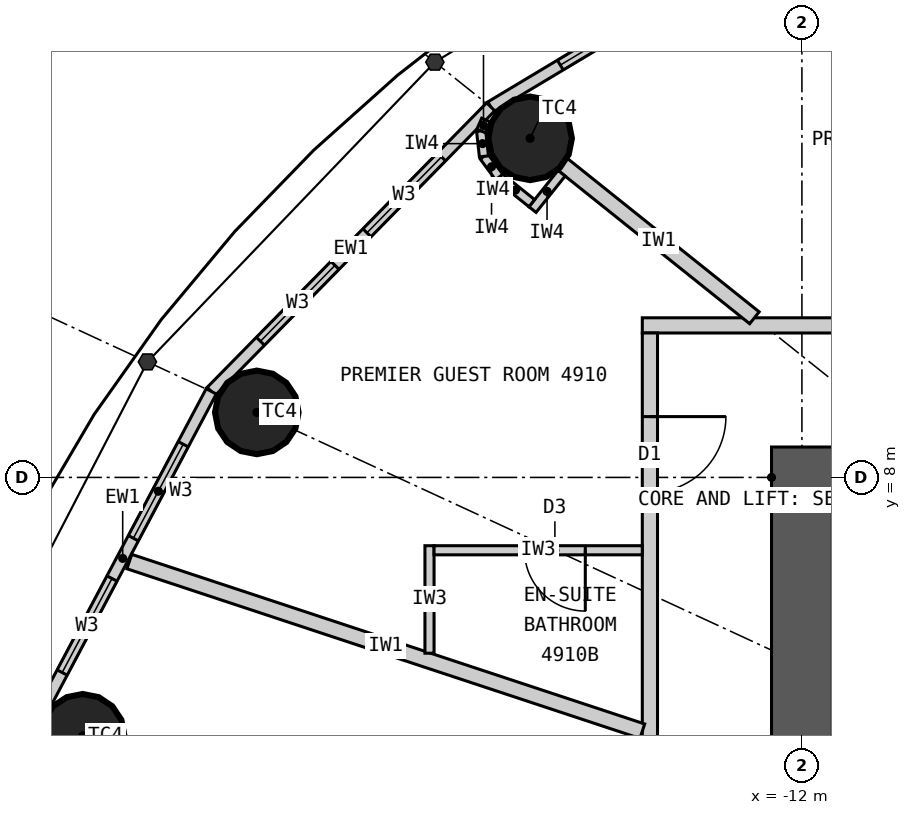
"""IFC4 building model, lengths in metres.
Left out: names, types, materials, properties, quantities, classifications, styles, units other than length and angle.
Written with IfcOpenShell. Run it as: python <this file> out.ifc"""

import sys

from ifc_helpers import new_model, si_unit, direction, frame, frame_2d, origin, origin_2d, place, context, subcontext, project, spatial, rectangle, circle, extrude, clip, halfspace, element, fill, save


model = new_model("IFC4")
c1 = context("Model", 3, precision=1e-05, world=origin(), true_north=direction((0.0, 1.0)))
c2 = subcontext(c1, "Body", "Model", "MODEL_VIEW")
j1 = project(units=[si_unit("LENGTHUNIT", "METRE"), si_unit("PLANEANGLEUNIT", "RADIAN")], contexts=[c1])
p1 = place(None, origin())
s1 = spatial("IfcSite", under=j1, at=p1, CompositionType="ELEMENT")
p2 = place(p1, origin())
s2 = spatial("IfcBuilding", under=s1, at=p2, CompositionType="ELEMENT")
p3 = place(p2, frame((0.0, 0.0, 183.0)))
s3 = spatial("IfcBuildingStorey", under=s2, at=p3, CompositionType="ELEMENT", Elevation=183.0)
for number, where, z_axis, x_axis in (
    (1, (-15.576, 12.461, 0.0), (0.0, 0.0, 1.0), (1.0, 0.0, 0.0)),
    (2, (-19.172, 8.855, 0.0), (0.0, 0.0, 1.0), (1.0, 0.0, 0.0)),
    (3, (-21.463, 4.601, 0.0), (0.0, 0.0, 1.0), (1.0, 0.0, 0.0)),
):
    element("IfcColumn", number, at=place(p3, frame(where, z_axis=z_axis, x_axis=x_axis)), inside=s3, PredefinedType="COLUMN", context=c2, shape_type="Clipping", body=[
        clip(extrude(circle(Radius=0.55, at=origin_2d()), origin(), (0.0, 0.0, 1.0), 3.3), halfspace(frame((0.0, 0.0, 2.25), z_axis=(0.0, 0.0, 1.0), x_axis=(1.0, 0.0, 0.0)), False)),
    ])
p4 = place(p3, frame((-12.4, 8.0, 0.0), z_axis=(0.0, 0.0, 1.0), x_axis=(1.0, 0.0, 0.0)))
e4 = element("IfcWall", 4, at=p4, inside=s3, PredefinedType="SHEAR", context=c2, shape_type="SweptSolid", body=[
    extrude(rectangle(XDim=24.8, YDim=0.8, at=frame_2d((12.4, 0.0))), origin(), (0.0, 0.0, 1.0), 3.3),
])
p5 = place(p4, frame((11.1, 0.0, 0.0)))
e5 = element("IfcOpeningElement", 5, at=p5, cuts=e4, PredefinedType="OPENING", context=c2, shape_type="SweptSolid", body=[
    extrude(rectangle(XDim=1.2, YDim=2.2, at=frame_2d((0.6, 1.1))), frame((0.0, 0.41, 0.0), z_axis=(0.0, -1.0, 0.0), x_axis=(1.0, 0.0, 0.0)), (0.0, 0.0, 1.0), 0.82),
])
p6 = place(p4, frame((18.7, 0.0, 0.0)))
e6 = element("IfcOpeningElement", 6, at=p6, cuts=e4, PredefinedType="OPENING", context=c2, shape_type="SweptSolid", body=[
    extrude(rectangle(XDim=0.9, YDim=2.2, at=frame_2d((0.45, 1.1))), frame((0.0, 0.41, 0.0), z_axis=(0.0, -1.0, 0.0), x_axis=(1.0, 0.0, 0.0)), (0.0, 0.0, 1.0), 0.82),
])
p7 = place(p3, frame((-12.0, 7.6, 0.0), z_axis=(0.0, 0.0, 1.0), x_axis=(0.0, -1.0, 0.0)))
e7 = element("IfcWall", 7, at=p7, inside=s3, PredefinedType="SHEAR", context=c2, shape_type="SweptSolid", body=[
    extrude(rectangle(XDim=15.2, YDim=0.8, at=frame_2d((7.6, 0.0))), origin(), (0.0, 0.0, 1.0), 3.3),
])
p8 = place(p7, frame((6.7, 0.0, 0.0)))
e8 = element("IfcOpeningElement", 8, at=p8, cuts=e7, PredefinedType="OPENING", context=c2, shape_type="SweptSolid", body=[
    extrude(rectangle(XDim=1.8, YDim=2.2, at=frame_2d((0.9, 1.1))), frame((0.0, 0.41, 0.0), z_axis=(0.0, -1.0, 0.0), x_axis=(1.0, 0.0, 0.0)), (0.0, 0.0, 1.0), 0.82),
])
p9 = place(p3, frame((-11.346, 15.722, 0.0), z_axis=(0.0, 0.0, 1.0), x_axis=(-0.857695199231, -0.514158482587, 0.0)))
e9 = element("IfcWall", 9, at=p9, inside=s3, PredefinedType="ELEMENTEDWALL", context=c2, shape_type="SweptSolid", body=[
    extrude(rectangle(XDim=5.536, YDim=0.15, at=frame_2d((2.768, 0.0))), origin(), (0.0, 0.0, 1.0), 3.05),
])
p10 = place(p9, frame((1.068, 0.0, 0.9)))
e10 = element("IfcOpeningElement", 10, at=p10, cuts=e9, PredefinedType="OPENING", context=c2, shape_type="SweptSolid", body=[
    extrude(rectangle(XDim=1.4, YDim=1.9, at=frame_2d((0.7, 0.95))), frame((0.0, 0.085, 0.0), z_axis=(0.0, -1.0, 0.0), x_axis=(1.0, 0.0, 0.0)), (0.0, 0.0, 1.0), 0.17),
])
p11 = place(p9, frame((3.068, 0.0, 0.9)))
e11 = element("IfcOpeningElement", 11, at=p11, cuts=e9, PredefinedType="OPENING", context=c2, shape_type="SweptSolid", body=[
    extrude(rectangle(XDim=1.4, YDim=1.9, at=frame_2d((0.7, 0.95))), frame((0.0, 0.085, 0.0), z_axis=(0.0, -1.0, 0.0), x_axis=(1.0, 0.0, 0.0)), (0.0, 0.0, 1.0), 0.17),
])
p12 = place(p3, frame((-16.095, 12.876, 0.0), z_axis=(0.0, 0.0, 1.0), x_axis=(-0.700727467776, -0.71342905457, 0.0)))
e12 = element("IfcWall", 12, at=p12, inside=s3, PredefinedType="ELEMENTEDWALL", context=c2, shape_type="SweptSolid", body=[
    extrude(rectangle(XDim=5.247, YDim=0.15, at=frame_2d((2.624, 0.0))), origin(), (0.0, 0.0, 1.0), 3.05),
])
p13 = place(p12, frame((0.924, 0.0, 0.9)))
e13 = element("IfcOpeningElement", 13, at=p13, cuts=e12, PredefinedType="OPENING", context=c2, shape_type="SweptSolid", body=[
    extrude(rectangle(XDim=1.4, YDim=1.9, at=frame_2d((0.7, 0.95))), frame((0.0, 0.085, 0.0), z_axis=(0.0, -1.0, 0.0), x_axis=(1.0, 0.0, 0.0)), (0.0, 0.0, 1.0), 0.17),
])
p14 = place(p12, frame((2.924, 0.0, 0.9)))
e14 = element("IfcOpeningElement", 14, at=p14, cuts=e12, PredefinedType="OPENING", context=c2, shape_type="SweptSolid", body=[
    extrude(rectangle(XDim=1.4, YDim=1.9, at=frame_2d((0.7, 0.95))), frame((0.0, 0.085, 0.0), z_axis=(0.0, -1.0, 0.0), x_axis=(1.0, 0.0, 0.0)), (0.0, 0.0, 1.0), 0.17),
])
p15 = place(p3, frame((-19.772, 9.132, 0.0), z_axis=(0.0, 0.0, 1.0), x_axis=(-0.468428906714, -0.883501193748, 0.0)))
e15 = element("IfcWall", 15, at=p15, inside=s3, PredefinedType="ELEMENTEDWALL", context=c2, shape_type="SweptSolid", body=[
    extrude(rectangle(XDim=4.974, YDim=0.15, at=frame_2d((2.487, 0.0))), origin(), (0.0, 0.0, 1.0), 3.05),
])
p16 = place(p15, frame((0.787, 0.0, 0.9)))
e16 = element("IfcOpeningElement", 16, at=p16, cuts=e15, PredefinedType="OPENING", context=c2, shape_type="SweptSolid", body=[
    extrude(rectangle(XDim=1.4, YDim=1.9, at=frame_2d((0.7, 0.95))), frame((0.0, 0.085, 0.0), z_axis=(0.0, -1.0, 0.0), x_axis=(1.0, 0.0, 0.0)), (0.0, 0.0, 1.0), 0.17),
])
p17 = place(p15, frame((2.787, 0.0, 0.9)))
e17 = element("IfcOpeningElement", 17, at=p17, cuts=e15, PredefinedType="OPENING", context=c2, shape_type="SweptSolid", body=[
    extrude(rectangle(XDim=1.4, YDim=1.9, at=frame_2d((0.7, 0.95))), frame((0.0, 0.085, 0.0), z_axis=(0.0, -1.0, 0.0), x_axis=(1.0, 0.0, 0.0)), (0.0, 0.0, 1.0), 0.17),
])
p18 = place(p3, frame((-14.1, 10.0, 0.0), z_axis=(0.0, 0.0, 1.0), x_axis=(1.0, 0.0, 0.0)))
e18 = element("IfcWall", 18, at=p18, inside=s3, PredefinedType="PARTITIONING", context=c2, shape_type="SweptSolid", body=[
    extrude(rectangle(XDim=28.2, YDim=0.2, at=frame_2d((14.1, 0.0))), origin(), (0.0, 0.0, 1.0), 3.05),
])
p19 = place(p18, frame((24.549, 0.0, 0.0)))
e19 = element("IfcOpeningElement", 19, at=p19, cuts=e18, PredefinedType="OPENING", context=c2, shape_type="SweptSolid", body=[
    extrude(rectangle(XDim=1.0, YDim=2.2, at=frame_2d((0.5, 1.1))), frame((0.0, 0.11, 0.0), z_axis=(0.0, -1.0, 0.0), x_axis=(1.0, 0.0, 0.0)), (0.0, 0.0, 1.0), 0.22),
])
p20 = place(p18, frame((18.829, 0.0, 0.0)))
e20 = element("IfcOpeningElement", 20, at=p20, cuts=e18, PredefinedType="OPENING", context=c2, shape_type="SweptSolid", body=[
    extrude(rectangle(XDim=1.0, YDim=2.2, at=frame_2d((0.5, 1.1))), frame((0.0, 0.11, 0.0), z_axis=(0.0, -1.0, 0.0), x_axis=(1.0, 0.0, 0.0)), (0.0, 0.0, 1.0), 0.22),
])
p21 = place(p18, frame((12.8, 0.0, 0.0)))
e21 = element("IfcOpeningElement", 21, at=p21, cuts=e18, PredefinedType="OPENING", context=c2, shape_type="SweptSolid", body=[
    extrude(rectangle(XDim=1.0, YDim=2.2, at=frame_2d((0.5, 1.1))), frame((0.0, 0.11, 0.0), z_axis=(0.0, -1.0, 0.0), x_axis=(1.0, 0.0, 0.0)), (0.0, 0.0, 1.0), 0.22),
])
p22 = place(p18, frame((5.25, 0.0, 0.0)))
e22 = element("IfcOpeningElement", 22, at=p22, cuts=e18, PredefinedType="OPENING", context=c2, shape_type="SweptSolid", body=[
    extrude(rectangle(XDim=1.0, YDim=2.2, at=frame_2d((0.5, 1.1))), frame((0.0, 0.11, 0.0), z_axis=(0.0, -1.0, 0.0), x_axis=(1.0, 0.0, 0.0)), (0.0, 0.0, 1.0), 0.22),
])
p23 = place(p3, frame((-14.0, 9.9, 0.0), z_axis=(0.0, 0.0, 1.0), x_axis=(0.0, -1.0, 0.0)))
e23 = element("IfcWall", 23, at=p23, inside=s3, PredefinedType="PARTITIONING", context=c2, shape_type="SweptSolid", body=[
    extrude(rectangle(XDim=19.8, YDim=0.2, at=frame_2d((9.9, 0.0))), origin(), (0.0, 0.0, 1.0), 3.05),
])
p24 = place(p23, frame((17.701, 0.0, 0.0)))
e24 = element("IfcOpeningElement", 24, at=p24, cuts=e23, PredefinedType="OPENING", context=c2, shape_type="SweptSolid", body=[
    extrude(rectangle(XDim=1.0, YDim=2.2, at=frame_2d((0.5, 1.1))), frame((0.0, 0.11, 0.0), z_axis=(0.0, -1.0, 0.0), x_axis=(1.0, 0.0, 0.0)), (0.0, 0.0, 1.0), 0.22),
])
p25 = place(p23, frame((1.1, 0.0, 0.0)))
e25 = element("IfcOpeningElement", 25, at=p25, cuts=e23, PredefinedType="OPENING", context=c2, shape_type="SweptSolid", body=[
    extrude(rectangle(XDim=1.0, YDim=2.2, at=frame_2d((0.5, 1.1))), frame((0.0, 0.11, 0.0), z_axis=(0.0, -1.0, 0.0), x_axis=(1.0, 0.0, 0.0)), (0.0, 0.0, 1.0), 0.22),
])
p26 = place(p23, frame((6.574, 0.0, 0.0)))
e26 = element("IfcOpeningElement", 26, at=p26, cuts=e23, PredefinedType="OPENING", context=c2, shape_type="SweptSolid", body=[
    extrude(rectangle(XDim=1.0, YDim=2.2, at=frame_2d((0.5, 1.1))), frame((0.0, 0.11, 0.0), z_axis=(0.0, -1.0, 0.0), x_axis=(1.0, 0.0, 0.0)), (0.0, 0.0, 1.0), 0.22),
])
p27 = place(p23, frame((12.465, 0.0, 0.0)))
e27 = element("IfcOpeningElement", 27, at=p27, cuts=e23, PredefinedType="OPENING", context=c2, shape_type="SweptSolid", body=[
    extrude(rectangle(XDim=1.0, YDim=2.1, at=frame_2d((0.5, 1.05))), frame((0.0, 0.11, 0.0), z_axis=(0.0, -1.0, 0.0), x_axis=(1.0, 0.0, 0.0)), (0.0, 0.0, 1.0), 0.22),
])
p28 = place(p3, frame((-12.625, 10.1, 0.0), z_axis=(0.0, 0.0, 1.0), x_axis=(-0.780876185034, 0.624685827954, 0.0)))
e28 = element("IfcWall", 28, at=p28, inside=s3, PredefinedType="PARTITIONING", context=c2, shape_type="SweptSolid", body=[
    extrude(rectangle(XDim=3.229, YDim=0.2, at=frame_2d((1.615, 0.0))), origin(), (0.0, 0.0, 1.0), 2.25),
])
p29 = place(p3, frame((-14.1, 4.661, 0.0), z_axis=(0.0, 0.0, 1.0), x_axis=(-0.949453216399, 0.313908569285, 0.0)))
e29 = element("IfcWall", 29, at=p29, inside=s3, PredefinedType="PARTITIONING", context=c2, shape_type="SweptSolid", body=[
    extrude(rectangle(XDim=7.109, YDim=0.2, at=frame_2d((3.554, 0.0))), origin(), (0.0, 0.0, 1.0), 3.05),
])
p30 = place(p3, frame((-16.9, 5.687, 0.0), z_axis=(0.0, 0.0, 1.0), x_axis=(0.0, 1.0, 0.0)))
e30 = element("IfcWall", 30, at=p30, inside=s3, PredefinedType="PARTITIONING", context=c2, shape_type="SweptSolid", body=[
    extrude(rectangle(XDim=1.414, YDim=0.12, at=frame_2d((0.707, 0.0))), origin(), (0.0, 0.0, 1.0), 3.05),
])
p31 = place(p3, frame((-14.1, 7.042, 0.0), z_axis=(0.0, 0.0, 1.0), x_axis=(-1.0, 0.0, 0.0)))
e31 = element("IfcWall", 31, at=p31, inside=s3, PredefinedType="PARTITIONING", context=c2, shape_type="SweptSolid", body=[
    extrude(rectangle(XDim=2.74, YDim=0.12, at=frame_2d((1.37, 0.0))), origin(), (0.0, 0.0, 1.0), 3.05),
])
p32 = place(p31, frame((0.75, 0.0, 0.0)))
e32 = element("IfcOpeningElement", 32, at=p32, cuts=e31, PredefinedType="OPENING", context=c2, shape_type="SweptSolid", body=[
    extrude(rectangle(XDim=0.8, YDim=2.1, at=frame_2d((0.4, 1.05))), frame((0.0, 0.07, 0.0), z_axis=(0.0, -1.0, 0.0), x_axis=(1.0, 0.0, 0.0)), (0.0, 0.0, 1.0), 0.14),
])
p33 = place(p3, frame((-15.162, 12.002, 0.0), z_axis=(0.0, 0.0, 1.0), x_axis=(-0.624597762427, -0.780946627607, 0.0)))
e33 = element("IfcWall", 33, at=p33, inside=s3, PredefinedType="PARTITIONING", context=c2, shape_type="SweptSolid", body=[
    extrude(rectangle(XDim=0.612, YDim=0.12, at=frame_2d((0.306, 0.0))), origin(), (0.0, 0.0, 1.0), 3.05),
])
p34 = place(p3, frame((-15.554, 11.608, 0.0), z_axis=(0.0, 0.0, 1.0), x_axis=(-0.780695577787, 0.624911525597, 0.0)))
e34 = element("IfcWall", 34, at=p34, inside=s3, PredefinedType="PARTITIONING", context=c2, shape_type="SweptSolid", body=[
    extrude(rectangle(XDim=0.55, YDim=0.12, at=frame_2d((0.275, 0.0))), origin(), (0.0, 0.0, 1.0), 3.05),
])
p35 = place(p3, frame((-15.984, 11.952, 0.0), z_axis=(0.0, 0.0, 1.0), x_axis=(-0.592335221171, 0.805691619517, 0.0)))
e35 = element("IfcWall", 35, at=p35, inside=s3, PredefinedType="PARTITIONING", context=c2, shape_type="SweptSolid", body=[
    extrude(rectangle(XDim=0.338, YDim=0.12, at=frame_2d((0.169, 0.0))), origin(), (0.0, 0.0, 1.0), 3.05),
])
p36 = place(p3, frame((-16.184, 12.224, 0.0), z_axis=(0.0, 0.0, 1.0), x_axis=(-0.110669692975, 0.993857242795, 0.0)))
e36 = element("IfcWall", 36, at=p36, inside=s3, PredefinedType="PARTITIONING", context=c2, shape_type="SweptSolid", body=[
    extrude(rectangle(XDim=0.337, YDim=0.12, at=frame_2d((0.169, 0.0))), origin(), (0.0, 0.0, 1.0), 3.05),
])
p37 = place(p3, frame((-16.221, 12.559, 0.0), z_axis=(0.0, 0.0, 1.0), x_axis=(0.401064416249, 0.916049853457, 0.0)))
e37 = element("IfcWall", 37, at=p37, inside=s3, PredefinedType="PARTITIONING", context=c2, shape_type="SweptSolid", body=[
    extrude(rectangle(XDim=0.156, YDim=0.12, at=frame_2d((0.078, 0.0))), origin(), (0.0, 0.0, 1.0), 3.05),
])
p38 = place(p11, origin())
e38 = element("IfcWindow", 38, at=p38, inside=s3, PartitioningType="SINGLE_PANEL", PredefinedType="WINDOW", context=c2, shape_type="SweptSolid", body=[
    extrude(rectangle(XDim=1.4, YDim=1.9, at=frame_2d((0.7, 0.95))), frame((0.0, 0.03, 0.0), z_axis=(0.0, -1.0, 0.0), x_axis=(1.0, 0.0, 0.0)), (0.0, 0.0, 1.0), 0.06),
])
fill(e11, e38)
p39 = place(p13, origin())
e39 = element("IfcWindow", 39, at=p39, inside=s3, PartitioningType="SINGLE_PANEL", PredefinedType="WINDOW", context=c2, shape_type="SweptSolid", body=[
    extrude(rectangle(XDim=1.4, YDim=1.9, at=frame_2d((0.7, 0.95))), frame((0.0, 0.03, 0.0), z_axis=(0.0, -1.0, 0.0), x_axis=(1.0, 0.0, 0.0)), (0.0, 0.0, 1.0), 0.06),
])
fill(e13, e39)
p40 = place(p14, origin())
e40 = element("IfcWindow", 40, at=p40, inside=s3, PartitioningType="SINGLE_PANEL", PredefinedType="WINDOW", context=c2, shape_type="SweptSolid", body=[
    extrude(rectangle(XDim=1.4, YDim=1.9, at=frame_2d((0.7, 0.95))), frame((0.0, 0.03, 0.0), z_axis=(0.0, -1.0, 0.0), x_axis=(1.0, 0.0, 0.0)), (0.0, 0.0, 1.0), 0.06),
])
fill(e14, e40)
p41 = place(p16, origin())
e41 = element("IfcWindow", 41, at=p41, inside=s3, PartitioningType="SINGLE_PANEL", PredefinedType="WINDOW", context=c2, shape_type="SweptSolid", body=[
    extrude(rectangle(XDim=1.4, YDim=1.9, at=frame_2d((0.7, 0.95))), frame((0.0, 0.03, 0.0), z_axis=(0.0, -1.0, 0.0), x_axis=(1.0, 0.0, 0.0)), (0.0, 0.0, 1.0), 0.06),
])
fill(e16, e41)
p42 = place(p17, origin())
e42 = element("IfcWindow", 42, at=p42, inside=s3, PartitioningType="SINGLE_PANEL", PredefinedType="WINDOW", context=c2, shape_type="SweptSolid", body=[
    extrude(rectangle(XDim=1.4, YDim=1.9, at=frame_2d((0.7, 0.95))), frame((0.0, 0.03, 0.0), z_axis=(0.0, -1.0, 0.0), x_axis=(1.0, 0.0, 0.0)), (0.0, 0.0, 1.0), 0.06),
])
fill(e17, e42)
p43 = place(p32, origin())
e43 = element("IfcDoor", 43, at=p43, inside=s3, OperationType="SINGLE_SWING_LEFT", PredefinedType="DOOR", context=c2, shape_type="SweptSolid", body=[
    extrude(rectangle(XDim=0.8, YDim=2.1, at=frame_2d((0.4, 1.05))), frame((0.0, 0.025, 0.0), z_axis=(0.0, -1.0, 0.0), x_axis=(1.0, 0.0, 0.0)), (0.0, 0.0, 1.0), 0.05),
])
fill(e32, e43)
p44 = place(p25, origin())
e44 = element("IfcDoor", 44, at=p44, inside=s3, OperationType="SINGLE_SWING_LEFT", PredefinedType="DOOR", context=c2, shape_type="SweptSolid", body=[
    extrude(rectangle(XDim=1.0, YDim=2.2, at=frame_2d((0.5, 1.1))), frame((0.0, 0.025, 0.0), z_axis=(0.0, -1.0, 0.0), x_axis=(1.0, 0.0, 0.0)), (0.0, 0.0, 1.0), 0.05),
])
fill(e25, e44)
save(model, sys.argv[1])
